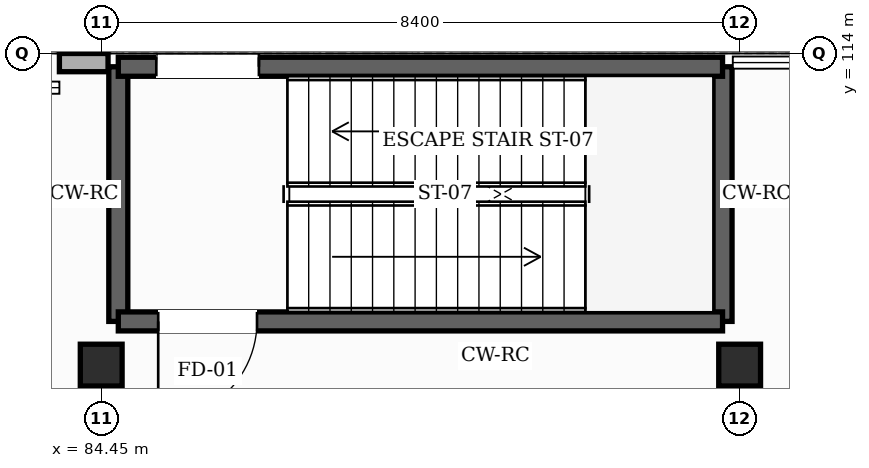
"""IFC4 building model, lengths in metres.
Left out: names, types, materials, properties, quantities, classifications, styles, units other than length and angle.
Written with IfcOpenShell. Run it as: python <this file> out.ifc"""

import sys

from ifc_helpers import new_model, si_unit, direction, frame, frame_2d, origin, origin_2d, place, context, subcontext, project, spatial, rectangle, hollow_rectangle, extrude, element, fill, save


model = new_model("IFC4")
c1 = context("Model", 3, precision=1e-05, world=origin(), true_north=direction((0.0, 1.0)))
c2 = subcontext(c1, "Body", "Model", "MODEL_VIEW")
j1 = project(units=[si_unit("LENGTHUNIT", "METRE"), si_unit("PLANEANGLEUNIT", "RADIAN")], contexts=[c1])
p1 = place(None, origin())
s1 = spatial("IfcSite", under=j1, at=p1, CompositionType="ELEMENT")
p2 = place(p1, origin())
s2 = spatial("IfcBuilding", under=s1, at=p2, CompositionType="ELEMENT")
p3 = place(p2, origin())
s3 = spatial("IfcBuildingStorey", under=s2, at=p3, CompositionType="ELEMENT", Elevation=0.0)
for number, where, z_axis, x_axis in (
    (1, (84.45, 109.9, 0.0), (0.0, 0.0, 1.0), (1.0, 0.0, 0.0)),
    (2, (92.85, 109.9, 0.0), (0.0, 0.0, 1.0), (1.0, 0.0, 0.0)),
):
    element("IfcColumn", number, at=place(p3, frame(where, z_axis=z_axis, x_axis=x_axis)), inside=s3, PredefinedType="COLUMN", context=c2, shape_type="SweptSolid", body=[
        extrude(hollow_rectangle(XDim=0.55, YDim=0.55, WallThickness=0.022, InnerFilletRadius=0.022, OuterFilletRadius=0.044, at=origin_2d()), origin(), (0.0, 0.0, 1.0), 5.4),
    ])
p4 = place(p3, frame((83.9, 113.88, 0.0), z_axis=(0.0, 0.0, 1.0), x_axis=(1.0, 0.0, 0.0)))
e3 = element("IfcWall", 3, at=p4, inside=s3, PredefinedType="SOLIDWALL", context=c2, shape_type="SweptSolid", body=[
    extrude(rectangle(XDim=0.64, YDim=0.24, at=frame_2d((0.32, 0.0))), origin(), (0.0, 0.0, 1.0), 5.135),
])
for number, where, z_axis, x_axis in (
    (4, (84.675, 110.475, 0.0), (0.0, 0.0, 1.0), (0.0, 1.0, 0.0)),
    (5, (92.625, 113.825, 0.0), (0.0, 0.0, 1.0), (0.0, -1.0, 0.0)),
):
    element("IfcWall", number, at=place(p3, frame(where, z_axis=z_axis, x_axis=x_axis)), inside=s3, PredefinedType="SHEAR", context=c2, shape_type="SweptSolid", body=[
        extrude(rectangle(XDim=3.35, YDim=0.25, at=frame_2d((1.675, 0.0))), origin(), (0.0, 0.0, 1.0), 5.15),
    ])
p5 = place(p3, frame((92.625, 110.475, 0.0), z_axis=(0.0, 0.0, 1.0), x_axis=(-1.0, 0.0, 0.0)))
e6 = element("IfcWall", 6, at=p5, inside=s3, PredefinedType="SHEAR", context=c2, shape_type="SweptSolid", body=[
    extrude(rectangle(XDim=7.95, YDim=0.25, at=frame_2d((3.975, 0.0))), origin(), (0.0, 0.0, 1.0), 5.15),
])
p6 = place(p5, frame((6.125, 0.0, 0.0)))
e7 = element("IfcOpeningElement", 7, at=p6, cuts=e6, PredefinedType="OPENING", context=c2, shape_type="SweptSolid", body=[
    extrude(rectangle(XDim=1.3, YDim=2.2, at=frame_2d((0.65, 1.1))), frame((0.0, 0.135, 0.0), z_axis=(0.0, -1.0, 0.0), x_axis=(1.0, 0.0, 0.0)), (0.0, 0.0, 1.0), 0.27),
])
p7 = place(p3, frame((84.675, 113.825, 0.0), z_axis=(0.0, 0.0, 1.0), x_axis=(1.0, 0.0, 0.0)))
e8 = element("IfcWall", 8, at=p7, inside=s3, PredefinedType="SHEAR", context=c2, shape_type="SweptSolid", body=[
    extrude(rectangle(XDim=7.95, YDim=0.25, at=frame_2d((3.975, 0.0))), origin(), (0.0, 0.0, 1.0), 5.15),
])
p8 = place(p7, frame((0.5, 0.0, 0.0)))
e9 = element("IfcOpeningElement", 9, at=p8, cuts=e8, PredefinedType="OPENING", context=c2, shape_type="SweptSolid", body=[
    extrude(rectangle(XDim=1.35, YDim=2.3, at=frame_2d((0.675, 1.15))), frame((0.0, 0.135, 0.0), z_axis=(0.0, -1.0, 0.0), x_axis=(1.0, 0.0, 0.0)), (0.0, 0.0, 1.0), 0.27),
])
p9 = place(p6, origin())
e10 = element("IfcDoor", 10, at=p9, inside=s3, OperationType="SINGLE_SWING_RIGHT", PredefinedType="DOOR", context=c2, shape_type="SweptSolid", body=[
    extrude(rectangle(XDim=1.3, YDim=2.2, at=frame_2d((0.65, 1.1))), frame((0.0, 0.025, 0.0), z_axis=(0.0, -1.0, 0.0), x_axis=(1.0, 0.0, 0.0)), (0.0, 0.0, 1.0), 0.05),
])
fill(e7, e10)
p10 = place(p8, origin())
e11 = element("IfcDoor", 11, at=p10, inside=s3, OperationType="SINGLE_SWING_RIGHT", PredefinedType="DOOR", context=c2, shape_type="SweptSolid", body=[
    extrude(rectangle(XDim=1.35, YDim=2.3, at=frame_2d((0.675, 1.15))), frame((0.0, 0.025, 0.0), z_axis=(0.0, -1.0, 0.0), x_axis=(1.0, 0.0, 0.0)), (0.0, 0.0, 1.0), 0.05),
])
fill(e9, e11)
save(model, sys.argv[1])
